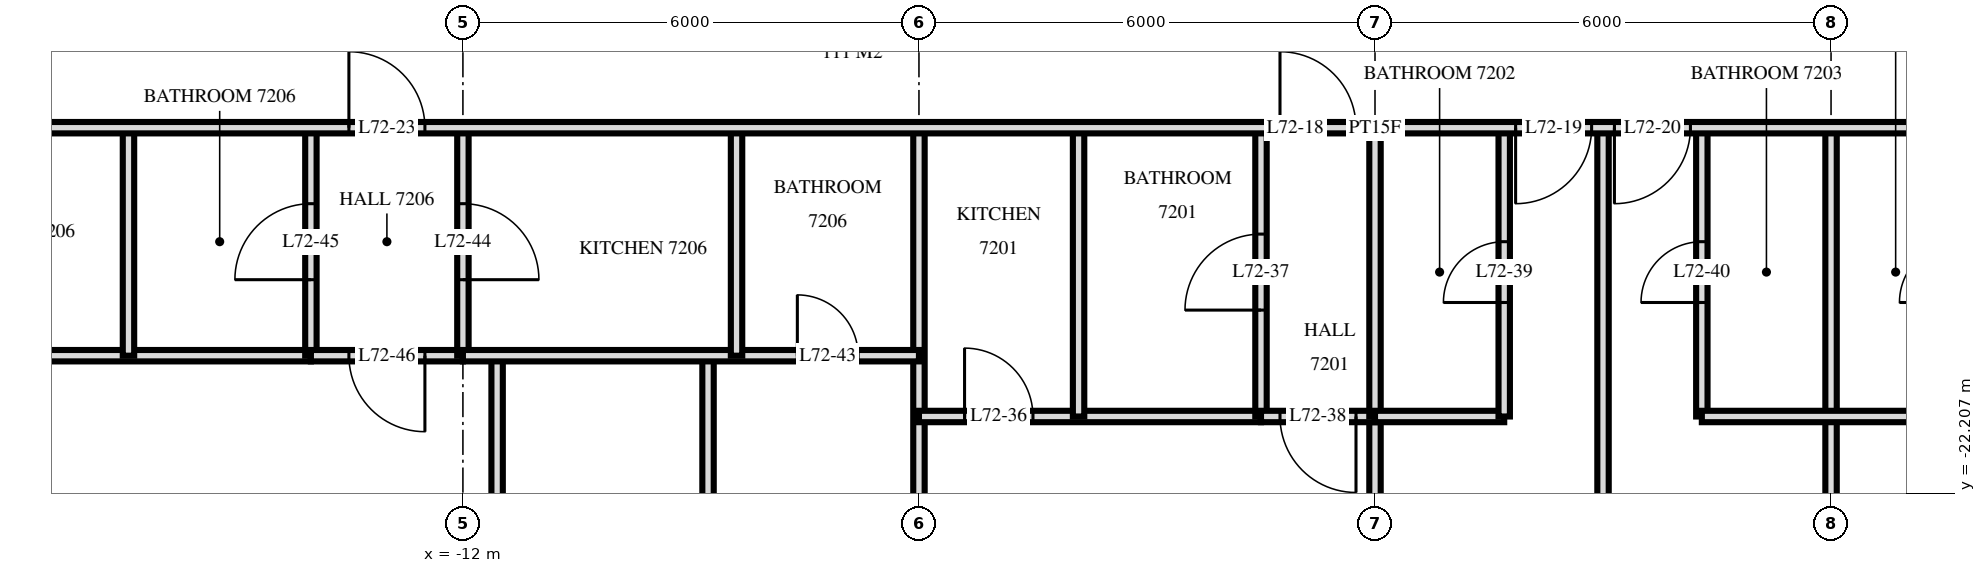
"""IFC4 building model, lengths in metres.
Left out: names, types, materials, properties, quantities, classifications, styles, units other than length and angle.
Written with IfcOpenShell. Run it as: python <this file> out.ifc"""

import sys

from ifc_helpers import new_model, si_unit, direction, frame, frame_2d, origin, place, context, subcontext, project, spatial, rectangle, extrude, element, fill, save


model = new_model("IFC4")
c1 = context("Model", 3, precision=1e-05, world=origin(), true_north=direction((0.0, 1.0)))
c2 = subcontext(c1, "Body", "Model", "MODEL_VIEW")
j1 = project(units=[si_unit("LENGTHUNIT", "METRE"), si_unit("PLANEANGLEUNIT", "RADIAN")], contexts=[c1])
p1 = place(None, origin())
s1 = spatial("IfcSite", under=j1, at=p1, CompositionType="ELEMENT")
p2 = place(p1, origin())
s2 = spatial("IfcBuilding", under=s1, at=p2, CompositionType="ELEMENT")
p3 = place(p2, frame((0.0, 0.0, 273.6)))
s3 = spatial("IfcBuildingStorey", under=s2, at=p3, CompositionType="ELEMENT", Elevation=273.6)
p4 = place(p3, frame((6.0, -33.62, 0.0), z_axis=(0.0, 0.0, 1.0), x_axis=(0.0, 1.0, 0.0)))
e1 = element("IfcWall", 1, at=p4, inside=s3, PredefinedType="PARTITIONING", context=c2, shape_type="SweptSolid", body=[
    extrude(rectangle(XDim=16.22, YDim=0.15, at=frame_2d((8.11, 0.0))), origin(), (0.0, 0.0, 1.0), 3.22),
])
p5 = place(p3, frame((4.3, -21.2, 0.0), z_axis=(0.0, 0.0, 1.0), x_axis=(0.0, 1.0, 0.0)))
e2 = element("IfcWall", 2, at=p5, inside=s3, PredefinedType="PARTITIONING", context=c2, shape_type="SweptSolid", body=[
    extrude(rectangle(XDim=3.8, YDim=0.15, at=frame_2d((1.9, 0.0))), origin(), (0.0, 0.0, 1.0), 3.22),
])
p6 = place(p5, frame((1.5, 0.0, 0.0)))
e3 = element("IfcOpeningElement", 3, at=p6, cuts=e2, PredefinedType="OPENING", context=c2, shape_type="SweptSolid", body=[
    extrude(rectangle(XDim=0.8, YDim=2.1, at=frame_2d((0.4, 1.05))), frame((0.0, 0.085, 0.0), z_axis=(0.0, -1.0, 0.0), x_axis=(1.0, 0.0, 0.0)), (0.0, 0.0, 1.0), 0.17),
])
p7 = place(p3, frame((3.0, -33.62, 0.0), z_axis=(0.0, 0.0, 1.0), x_axis=(0.0, 1.0, 0.0)))
e4 = element("IfcWall", 4, at=p7, inside=s3, PredefinedType="PARTITIONING", context=c2, shape_type="SweptSolid", body=[
    extrude(rectangle(XDim=16.22, YDim=0.15, at=frame_2d((8.11, 0.0))), origin(), (0.0, 0.0, 1.0), 3.22),
])
p8 = place(p3, frame((1.7, -21.2, 0.0), z_axis=(0.0, 0.0, 1.0), x_axis=(0.0, 1.0, 0.0)))
e5 = element("IfcWall", 5, at=p8, inside=s3, PredefinedType="PARTITIONING", context=c2, shape_type="SweptSolid", body=[
    extrude(rectangle(XDim=3.8, YDim=0.15, at=frame_2d((1.9, 0.0))), origin(), (0.0, 0.0, 1.0), 3.22),
])
p9 = place(p8, frame((1.5, 0.0, 0.0)))
e6 = element("IfcOpeningElement", 6, at=p9, cuts=e5, PredefinedType="OPENING", context=c2, shape_type="SweptSolid", body=[
    extrude(rectangle(XDim=0.8, YDim=2.1, at=frame_2d((0.4, 1.05))), frame((0.0, 0.085, 0.0), z_axis=(0.0, -1.0, 0.0), x_axis=(1.0, 0.0, 0.0)), (0.0, 0.0, 1.0), 0.17),
])
p10 = place(p3, frame((0.0, -21.2, 0.0), z_axis=(0.0, 0.0, 1.0), x_axis=(0.0, 1.0, 0.0)))
e7 = element("IfcWall", 7, at=p10, inside=s3, PredefinedType="PARTITIONING", context=c2, shape_type="SweptSolid", body=[
    extrude(rectangle(XDim=3.8, YDim=0.15, at=frame_2d((1.9, 0.0))), origin(), (0.0, 0.0, 1.0), 3.22),
])
p11 = place(p3, frame((0.0, -33.62, 0.0), z_axis=(0.0, 0.0, 1.0), x_axis=(0.0, 1.0, 0.0)))
e8 = element("IfcWall", 8, at=p11, inside=s3, PredefinedType="PARTITIONING", context=c2, shape_type="SweptSolid", body=[
    extrude(rectangle(XDim=12.42, YDim=0.15, at=frame_2d((6.21, 0.0))), origin(), (0.0, 0.0, 1.0), 3.22),
])
p12 = place(p3, frame((-1.5, -21.2, 0.0), z_axis=(0.0, 0.0, 1.0), x_axis=(0.0, 1.0, 0.0)))
e9 = element("IfcWall", 9, at=p12, inside=s3, PredefinedType="PARTITIONING", context=c2, shape_type="SweptSolid", body=[
    extrude(rectangle(XDim=3.8, YDim=0.15, at=frame_2d((1.9, 0.0))), origin(), (0.0, 0.0, 1.0), 3.22),
])
p13 = place(p12, frame((1.4, 0.0, 0.0)))
e10 = element("IfcOpeningElement", 10, at=p13, cuts=e9, PredefinedType="OPENING", context=c2, shape_type="SweptSolid", body=[
    extrude(rectangle(XDim=1.0, YDim=2.1, at=frame_2d((0.5, 1.05))), frame((0.0, 0.085, 0.0), z_axis=(0.0, -1.0, 0.0), x_axis=(1.0, 0.0, 0.0)), (0.0, 0.0, 1.0), 0.17),
])
p14 = place(p3, frame((-3.9, -21.2, 0.0), z_axis=(0.0, 0.0, 1.0), x_axis=(0.0, 1.0, 0.0)))
e11 = element("IfcWall", 11, at=p14, inside=s3, PredefinedType="PARTITIONING", context=c2, shape_type="SweptSolid", body=[
    extrude(rectangle(XDim=3.8, YDim=0.15, at=frame_2d((1.9, 0.0))), origin(), (0.0, 0.0, 1.0), 3.22),
])
p15 = place(p3, frame((-6.0, -33.62, 0.0), z_axis=(0.0, 0.0, 1.0), x_axis=(0.0, 1.0, 0.0)))
e12 = element("IfcWall", 12, at=p15, inside=s3, PredefinedType="PARTITIONING", context=c2, shape_type="SweptSolid", body=[
    extrude(rectangle(XDim=16.22, YDim=0.15, at=frame_2d((8.11, 0.0))), origin(), (0.0, 0.0, 1.0), 3.22),
])
p16 = place(p3, frame((-8.4, -20.4, 0.0), z_axis=(0.0, 0.0, 1.0), x_axis=(0.0, 1.0, 0.0)))
e13 = element("IfcWall", 13, at=p16, inside=s3, PredefinedType="PARTITIONING", context=c2, shape_type="SweptSolid", body=[
    extrude(rectangle(XDim=3.0, YDim=0.15, at=frame_2d((1.5, 0.0))), origin(), (0.0, 0.0, 1.0), 3.22),
])
p17 = place(p3, frame((-8.775, -33.62, 0.0), z_axis=(0.0, 0.0, 1.0), x_axis=(0.0, 1.0, 0.0)))
e14 = element("IfcWall", 14, at=p17, inside=s3, PredefinedType="PARTITIONING", context=c2, shape_type="SweptSolid", body=[
    extrude(rectangle(XDim=13.22, YDim=0.15, at=frame_2d((6.61, 0.0))), origin(), (0.0, 0.0, 1.0), 3.22),
])
p18 = place(p17, frame((6.07, 0.0, 0.0)))
e15 = element("IfcOpeningElement", 15, at=p18, cuts=e14, PredefinedType="OPENING", context=c2, shape_type="SweptSolid", body=[
    extrude(rectangle(XDim=0.9, YDim=2.1, at=frame_2d((0.45, 1.05))), frame((0.0, 0.085, 0.0), z_axis=(0.0, -1.0, 0.0), x_axis=(1.0, 0.0, 0.0)), (0.0, 0.0, 1.0), 0.17),
])
p19 = place(p3, frame((-11.55, -33.62, 0.0), z_axis=(0.0, 0.0, 1.0), x_axis=(0.0, 1.0, 0.0)))
e16 = element("IfcWall", 16, at=p19, inside=s3, PredefinedType="PARTITIONING", context=c2, shape_type="SweptSolid", body=[
    extrude(rectangle(XDim=13.22, YDim=0.15, at=frame_2d((6.61, 0.0))), origin(), (0.0, 0.0, 1.0), 3.22),
])
p20 = place(p19, frame((6.05, 0.0, 0.0)))
e17 = element("IfcOpeningElement", 17, at=p20, cuts=e16, PredefinedType="OPENING", context=c2, shape_type="SweptSolid", body=[
    extrude(rectangle(XDim=0.9, YDim=2.1, at=frame_2d((0.45, 1.05))), frame((0.0, 0.085, 0.0), z_axis=(0.0, -1.0, 0.0), x_axis=(1.0, 0.0, 0.0)), (0.0, 0.0, 1.0), 0.17),
])
p21 = place(p3, frame((-12.0, -20.4, 0.0), z_axis=(0.0, 0.0, 1.0), x_axis=(0.0, 1.0, 0.0)))
e18 = element("IfcWall", 18, at=p21, inside=s3, PredefinedType="PARTITIONING", context=c2, shape_type="SweptSolid", body=[
    extrude(rectangle(XDim=3.0, YDim=0.15, at=frame_2d((1.5, 0.0))), origin(), (0.0, 0.0, 1.0), 3.22),
])
p22 = place(p21, frame((1.0, 0.0, 0.0)))
e19 = element("IfcOpeningElement", 19, at=p22, cuts=e18, PredefinedType="OPENING", context=c2, shape_type="SweptSolid", body=[
    extrude(rectangle(XDim=1.0, YDim=2.1, at=frame_2d((0.5, 1.05))), frame((0.0, 0.085, 0.0), z_axis=(0.0, -1.0, 0.0), x_axis=(1.0, 0.0, 0.0)), (0.0, 0.0, 1.0), 0.17),
])
p23 = place(p3, frame((-14.0, -20.4, 0.0), z_axis=(0.0, 0.0, 1.0), x_axis=(0.0, 1.0, 0.0)))
e20 = element("IfcWall", 20, at=p23, inside=s3, PredefinedType="PARTITIONING", context=c2, shape_type="SweptSolid", body=[
    extrude(rectangle(XDim=3.0, YDim=0.15, at=frame_2d((1.5, 0.0))), origin(), (0.0, 0.0, 1.0), 3.22),
])
p24 = place(p23, frame((1.0, 0.0, 0.0)))
e21 = element("IfcOpeningElement", 21, at=p24, cuts=e20, PredefinedType="OPENING", context=c2, shape_type="SweptSolid", body=[
    extrude(rectangle(XDim=1.0, YDim=2.1, at=frame_2d((0.5, 1.05))), frame((0.0, 0.085, 0.0), z_axis=(0.0, -1.0, 0.0), x_axis=(1.0, 0.0, 0.0)), (0.0, 0.0, 1.0), 0.17),
])
p25 = place(p3, frame((-16.4, -20.4, 0.0), z_axis=(0.0, 0.0, 1.0), x_axis=(0.0, 1.0, 0.0)))
e22 = element("IfcWall", 22, at=p25, inside=s3, PredefinedType="PARTITIONING", context=c2, shape_type="SweptSolid", body=[
    extrude(rectangle(XDim=3.0, YDim=0.15, at=frame_2d((1.5, 0.0))), origin(), (0.0, 0.0, 1.0), 3.22),
])
p26 = place(p3, frame((-1.5, -21.2, 0.0), z_axis=(0.0, 0.0, 1.0), x_axis=(1.0, 0.0, 0.0)))
e23 = element("IfcWall", 23, at=p26, inside=s3, PredefinedType="PARTITIONING", context=c2, shape_type="SweptSolid", body=[
    extrude(rectangle(XDim=1.5, YDim=0.15, at=frame_2d((0.75, 0.0))), origin(), (0.0, 0.0, 1.0), 3.22),
])
p27 = place(p26, frame((0.25, 0.0, 0.0)))
e24 = element("IfcOpeningElement", 24, at=p27, cuts=e23, PredefinedType="OPENING", context=c2, shape_type="SweptSolid", body=[
    extrude(rectangle(XDim=1.0, YDim=2.1, at=frame_2d((0.5, 1.05))), frame((0.0, 0.085, 0.0), z_axis=(0.0, -1.0, 0.0), x_axis=(1.0, 0.0, 0.0)), (0.0, 0.0, 1.0), 0.17),
])
p28 = place(p3, frame((-6.0, -21.2, 0.0), z_axis=(0.0, 0.0, 1.0), x_axis=(1.0, 0.0, 0.0)))
e25 = element("IfcWall", 25, at=p28, inside=s3, PredefinedType="PARTITIONING", context=c2, shape_type="SweptSolid", body=[
    extrude(rectangle(XDim=4.5, YDim=0.15, at=frame_2d((2.25, 0.0))), origin(), (0.0, 0.0, 1.0), 3.22),
])
p29 = place(p28, frame((0.6, 0.0, 0.0)))
e26 = element("IfcOpeningElement", 26, at=p29, cuts=e25, PredefinedType="OPENING", context=c2, shape_type="SweptSolid", body=[
    extrude(rectangle(XDim=0.9, YDim=2.1, at=frame_2d((0.45, 1.05))), frame((0.0, 0.085, 0.0), z_axis=(0.0, -1.0, 0.0), x_axis=(1.0, 0.0, 0.0)), (0.0, 0.0, 1.0), 0.17),
])
p30 = place(p3, frame((0.0, -21.2, 0.0), z_axis=(0.0, 0.0, 1.0), x_axis=(1.0, 0.0, 0.0)))
e27 = element("IfcWall", 27, at=p30, inside=s3, PredefinedType="PARTITIONING", context=c2, shape_type="SweptSolid", body=[
    extrude(rectangle(XDim=1.7, YDim=0.15, at=frame_2d((0.85, 0.0))), origin(), (0.0, 0.0, 1.0), 3.22),
])
p31 = place(p3, frame((4.3, -21.2, 0.0), z_axis=(0.0, 0.0, 1.0), x_axis=(1.0, 0.0, 0.0)))
e28 = element("IfcWall", 28, at=p31, inside=s3, PredefinedType="PARTITIONING", context=c2, shape_type="SweptSolid", body=[
    extrude(rectangle(XDim=3.4, YDim=0.15, at=frame_2d((1.7, 0.0))), origin(), (0.0, 0.0, 1.0), 3.22),
])
p32 = place(p3, frame((-14.0, -20.4, 0.0), z_axis=(0.0, 0.0, 1.0), x_axis=(1.0, 0.0, 0.0)))
e29 = element("IfcWall", 29, at=p32, inside=s3, PredefinedType="PARTITIONING", context=c2, shape_type="SweptSolid", body=[
    extrude(rectangle(XDim=2.0, YDim=0.15, at=frame_2d((1.0, 0.0))), origin(), (0.0, 0.0, 1.0), 3.22),
])
p33 = place(p32, frame((0.5, 0.0, 0.0)))
e30 = element("IfcOpeningElement", 30, at=p33, cuts=e29, PredefinedType="OPENING", context=c2, shape_type="SweptSolid", body=[
    extrude(rectangle(XDim=1.0, YDim=2.1, at=frame_2d((0.5, 1.05))), frame((0.0, 0.085, 0.0), z_axis=(0.0, -1.0, 0.0), x_axis=(1.0, 0.0, 0.0)), (0.0, 0.0, 1.0), 0.17),
])
p34 = place(p3, frame((-22.92, -20.4, 0.0), z_axis=(0.0, 0.0, 1.0), x_axis=(1.0, 0.0, 0.0)))
e31 = element("IfcWall", 31, at=p34, inside=s3, PredefinedType="PARTITIONING", context=c2, shape_type="SweptSolid", body=[
    extrude(rectangle(XDim=8.92, YDim=0.15, at=frame_2d((4.46, 0.0))), origin(), (0.0, 0.0, 1.0), 3.22),
])
p35 = place(p3, frame((-12.0, -20.4, 0.0), z_axis=(0.0, 0.0, 1.0), x_axis=(1.0, 0.0, 0.0)))
e32 = element("IfcWall", 32, at=p35, inside=s3, PredefinedType="PARTITIONING", context=c2, shape_type="SweptSolid", body=[
    extrude(rectangle(XDim=6.0, YDim=0.15, at=frame_2d((3.0, 0.0))), origin(), (0.0, 0.0, 1.0), 3.22),
])
p36 = place(p35, frame((4.4, 0.0, 0.0)))
e33 = element("IfcOpeningElement", 33, at=p36, cuts=e32, PredefinedType="OPENING", context=c2, shape_type="SweptSolid", body=[
    extrude(rectangle(XDim=0.8, YDim=2.1, at=frame_2d((0.4, 1.05))), frame((0.0, 0.085, 0.0), z_axis=(0.0, -1.0, 0.0), x_axis=(1.0, 0.0, 0.0)), (0.0, 0.0, 1.0), 0.17),
])
p37 = place(p3, frame((-22.92, -17.4, 0.0), z_axis=(0.0, 0.0, 1.0), x_axis=(1.0, 0.0, 0.0)))
e34 = element("IfcWall", 34, at=p37, inside=s3, PredefinedType="PARTITIONING", context=c2, shape_type="SweptSolid", body=[
    extrude(rectangle(XDim=45.84, YDim=0.15, at=frame_2d((22.92, 0.0))), origin(), (0.0, 0.0, 1.0), 3.22),
])
p38 = place(p37, frame((21.67, 0.0, 0.0)))
e35 = element("IfcOpeningElement", 35, at=p38, cuts=e34, PredefinedType="OPENING", context=c2, shape_type="SweptSolid", body=[
    extrude(rectangle(XDim=1.0, YDim=2.1, at=frame_2d((0.5, 1.05))), frame((0.0, 0.085, 0.0), z_axis=(0.0, -1.0, 0.0), x_axis=(1.0, 0.0, 0.0)), (0.0, 0.0, 1.0), 0.17),
])
p39 = place(p37, frame((24.77, 0.0, 0.0)))
e36 = element("IfcOpeningElement", 36, at=p39, cuts=e34, PredefinedType="OPENING", context=c2, shape_type="SweptSolid", body=[
    extrude(rectangle(XDim=1.0, YDim=2.1, at=frame_2d((0.5, 1.05))), frame((0.0, 0.085, 0.0), z_axis=(0.0, -1.0, 0.0), x_axis=(1.0, 0.0, 0.0)), (0.0, 0.0, 1.0), 0.17),
])
p40 = place(p37, frame((26.07, 0.0, 0.0)))
e37 = element("IfcOpeningElement", 37, at=p40, cuts=e34, PredefinedType="OPENING", context=c2, shape_type="SweptSolid", body=[
    extrude(rectangle(XDim=1.0, YDim=2.1, at=frame_2d((0.5, 1.05))), frame((0.0, 0.085, 0.0), z_axis=(0.0, -1.0, 0.0), x_axis=(1.0, 0.0, 0.0)), (0.0, 0.0, 1.0), 0.17),
])
p41 = place(p37, frame((30.77, 0.0, 0.0)))
e38 = element("IfcOpeningElement", 38, at=p41, cuts=e34, PredefinedType="OPENING", context=c2, shape_type="SweptSolid", body=[
    extrude(rectangle(XDim=1.0, YDim=2.1, at=frame_2d((0.5, 1.05))), frame((0.0, 0.085, 0.0), z_axis=(0.0, -1.0, 0.0), x_axis=(1.0, 0.0, 0.0)), (0.0, 0.0, 1.0), 0.17),
])
p42 = place(p37, frame((32.07, 0.0, 0.0)))
e39 = element("IfcOpeningElement", 39, at=p42, cuts=e34, PredefinedType="OPENING", context=c2, shape_type="SweptSolid", body=[
    extrude(rectangle(XDim=1.0, YDim=2.1, at=frame_2d((0.5, 1.05))), frame((0.0, 0.085, 0.0), z_axis=(0.0, -1.0, 0.0), x_axis=(1.0, 0.0, 0.0)), (0.0, 0.0, 1.0), 0.17),
])
p43 = place(p37, frame((9.42, 0.0, 0.0)))
e40 = element("IfcOpeningElement", 40, at=p43, cuts=e34, PredefinedType="OPENING", context=c2, shape_type="SweptSolid", body=[
    extrude(rectangle(XDim=1.0, YDim=2.1, at=frame_2d((0.5, 1.05))), frame((0.0, 0.085, 0.0), z_axis=(0.0, -1.0, 0.0), x_axis=(1.0, 0.0, 0.0)), (0.0, 0.0, 1.0), 0.17),
])
p44 = place(p37, frame((2.67, 0.0, 0.0)))
e41 = element("IfcOpeningElement", 41, at=p44, cuts=e34, PredefinedType="OPENING", context=c2, shape_type="SweptSolid", body=[
    extrude(rectangle(XDim=1.0, YDim=2.1, at=frame_2d((0.5, 1.05))), frame((0.0, 0.085, 0.0), z_axis=(0.0, -1.0, 0.0), x_axis=(1.0, 0.0, 0.0)), (0.0, 0.0, 1.0), 0.17),
])
p45 = place(p37, frame((37.82, 0.0, 0.0)))
e42 = element("IfcOpeningElement", 42, at=p45, cuts=e34, PredefinedType="OPENING", context=c2, shape_type="SweptSolid", body=[
    extrude(rectangle(XDim=1.0, YDim=2.1, at=frame_2d((0.5, 1.05))), frame((0.0, 0.085, 0.0), z_axis=(0.0, -1.0, 0.0), x_axis=(1.0, 0.0, 0.0)), (0.0, 0.0, 1.0), 0.17),
])
p46 = place(p38, origin())
e43 = element("IfcDoor", 43, at=p46, inside=s3, OperationType="SINGLE_SWING_RIGHT", PredefinedType="DOOR", context=c2, shape_type="SweptSolid", body=[
    extrude(rectangle(XDim=1.0, YDim=2.1, at=frame_2d((0.5, 1.05))), frame((0.0, 0.025, 0.0), z_axis=(0.0, -1.0, 0.0), x_axis=(1.0, 0.0, 0.0)), (0.0, 0.0, 1.0), 0.05),
])
fill(e35, e43)
p47 = place(p39, frame((0.5, 0.0, 0.0), z_axis=(0.0, 0.0, 1.0), x_axis=(-1.0, 0.0, 0.0)))
e44 = element("IfcDoor", 44, at=p47, inside=s3, OperationType="SINGLE_SWING_LEFT", PredefinedType="DOOR", context=c2, shape_type="SweptSolid", body=[
    extrude(rectangle(XDim=1.0, YDim=2.1, at=frame_2d((0.0, 1.05))), frame((0.0, -0.025, 0.0), z_axis=(0.0, 1.0, 0.0), x_axis=(-1.0, 0.0, 0.0)), (0.0, 0.0, 1.0), 0.05),
])
fill(e36, e44)
p48 = place(p40, frame((0.5, 0.0, 0.0), z_axis=(0.0, 0.0, 1.0), x_axis=(-1.0, 0.0, 0.0)))
e45 = element("IfcDoor", 45, at=p48, inside=s3, OperationType="SINGLE_SWING_LEFT", PredefinedType="DOOR", context=c2, shape_type="SweptSolid", body=[
    extrude(rectangle(XDim=1.0, YDim=2.1, at=frame_2d((0.0, 1.05))), frame((0.0, -0.025, 0.0), z_axis=(0.0, 1.0, 0.0), x_axis=(-1.0, 0.0, 0.0)), (0.0, 0.0, 1.0), 0.05),
])
fill(e37, e45)
p49 = place(p43, origin())
e46 = element("IfcDoor", 46, at=p49, inside=s3, OperationType="SINGLE_SWING_RIGHT", PredefinedType="DOOR", context=c2, shape_type="SweptSolid", body=[
    extrude(rectangle(XDim=1.0, YDim=2.1, at=frame_2d((0.5, 1.05))), frame((0.0, 0.025, 0.0), z_axis=(0.0, -1.0, 0.0), x_axis=(1.0, 0.0, 0.0)), (0.0, 0.0, 1.0), 0.05),
])
fill(e40, e46)
p50 = place(p29, origin())
e47 = element("IfcDoor", 47, at=p50, inside=s3, OperationType="SINGLE_SWING_RIGHT", PredefinedType="DOOR", context=c2, shape_type="SweptSolid", body=[
    extrude(rectangle(XDim=0.9, YDim=2.1, at=frame_2d((0.45, 1.05))), frame((0.0, 0.025, 0.0), z_axis=(0.0, -1.0, 0.0), x_axis=(1.0, 0.0, 0.0)), (0.0, 0.0, 1.0), 0.05),
])
fill(e26, e47)
p51 = place(p13, origin())
e48 = element("IfcDoor", 48, at=p51, inside=s3, OperationType="SINGLE_SWING_RIGHT", PredefinedType="DOOR", context=c2, shape_type="SweptSolid", body=[
    extrude(rectangle(XDim=1.0, YDim=2.1, at=frame_2d((0.5, 1.05))), frame((0.0, 0.025, 0.0), z_axis=(0.0, -1.0, 0.0), x_axis=(1.0, 0.0, 0.0)), (0.0, 0.0, 1.0), 0.05),
])
fill(e10, e48)
p52 = place(p27, frame((0.5, 0.0, 0.0), z_axis=(0.0, 0.0, 1.0), x_axis=(-1.0, 0.0, 0.0)))
e49 = element("IfcDoor", 49, at=p52, inside=s3, OperationType="SINGLE_SWING_RIGHT", PredefinedType="DOOR", context=c2, shape_type="SweptSolid", body=[
    extrude(rectangle(XDim=1.0, YDim=2.1, at=frame_2d((0.0, 1.05))), frame((0.0, -0.025, 0.0), z_axis=(0.0, 1.0, 0.0), x_axis=(-1.0, 0.0, 0.0)), (0.0, 0.0, 1.0), 0.05),
])
fill(e24, e49)
p53 = place(p9, origin())
e50 = element("IfcDoor", 50, at=p53, inside=s3, OperationType="SINGLE_SWING_RIGHT", PredefinedType="DOOR", context=c2, shape_type="SweptSolid", body=[
    extrude(rectangle(XDim=0.8, YDim=2.1, at=frame_2d((0.4, 1.05))), frame((0.0, 0.025, 0.0), z_axis=(0.0, -1.0, 0.0), x_axis=(1.0, 0.0, 0.0)), (0.0, 0.0, 1.0), 0.05),
])
fill(e6, e50)
p54 = place(p6, origin())
e51 = element("IfcDoor", 51, at=p54, inside=s3, OperationType="SINGLE_SWING_RIGHT", PredefinedType="DOOR", context=c2, shape_type="SweptSolid", body=[
    extrude(rectangle(XDim=0.8, YDim=2.1, at=frame_2d((0.4, 1.05))), frame((0.0, 0.025, 0.0), z_axis=(0.0, -1.0, 0.0), x_axis=(1.0, 0.0, 0.0)), (0.0, 0.0, 1.0), 0.05),
])
fill(e3, e51)
p55 = place(p36, origin())
e52 = element("IfcDoor", 52, at=p55, inside=s3, OperationType="SINGLE_SWING_RIGHT", PredefinedType="DOOR", context=c2, shape_type="SweptSolid", body=[
    extrude(rectangle(XDim=0.8, YDim=2.1, at=frame_2d((0.4, 1.05))), frame((0.0, 0.025, 0.0), z_axis=(0.0, -1.0, 0.0), x_axis=(1.0, 0.0, 0.0)), (0.0, 0.0, 1.0), 0.05),
])
fill(e33, e52)
p56 = place(p22, frame((0.5, 0.0, 0.0), z_axis=(0.0, 0.0, 1.0), x_axis=(-1.0, 0.0, 0.0)))
e53 = element("IfcDoor", 53, at=p56, inside=s3, OperationType="SINGLE_SWING_LEFT", PredefinedType="DOOR", context=c2, shape_type="SweptSolid", body=[
    extrude(rectangle(XDim=1.0, YDim=2.1, at=frame_2d((0.0, 1.05))), frame((0.0, -0.025, 0.0), z_axis=(0.0, 1.0, 0.0), x_axis=(-1.0, 0.0, 0.0)), (0.0, 0.0, 1.0), 0.05),
])
fill(e19, e53)
p57 = place(p24, origin())
e54 = element("IfcDoor", 54, at=p57, inside=s3, OperationType="SINGLE_SWING_RIGHT", PredefinedType="DOOR", context=c2, shape_type="SweptSolid", body=[
    extrude(rectangle(XDim=1.0, YDim=2.1, at=frame_2d((0.5, 1.05))), frame((0.0, 0.025, 0.0), z_axis=(0.0, -1.0, 0.0), x_axis=(1.0, 0.0, 0.0)), (0.0, 0.0, 1.0), 0.05),
])
fill(e21, e54)
p58 = place(p33, frame((0.5, 0.0, 0.0), z_axis=(0.0, 0.0, 1.0), x_axis=(-1.0, 0.0, 0.0)))
e55 = element("IfcDoor", 55, at=p58, inside=s3, OperationType="SINGLE_SWING_RIGHT", PredefinedType="DOOR", context=c2, shape_type="SweptSolid", body=[
    extrude(rectangle(XDim=1.0, YDim=2.1, at=frame_2d((0.0, 1.05))), frame((0.0, -0.025, 0.0), z_axis=(0.0, 1.0, 0.0), x_axis=(-1.0, 0.0, 0.0)), (0.0, 0.0, 1.0), 0.05),
])
fill(e30, e55)
save(model, sys.argv[1])
